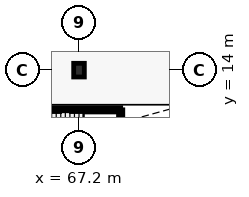
"""IFC4 building model, lengths in metres.
Left out: names, types, materials, properties, quantities, classifications, styles, units other than length and angle.
Written with IfcOpenShell. Run it as: python <this file> out.ifc"""

import sys

from ifc_helpers import new_model, si_unit, direction, frame, frame_2d, origin, origin_2d, place, context, subcontext, project, spatial, rectangle, extrude, element, save


model = new_model("IFC4")
c1 = context("Model", 3, precision=1e-05, world=origin(), true_north=direction((0.0, 1.0)))
c2 = subcontext(c1, "Body", "Model", "MODEL_VIEW")
j1 = project(units=[si_unit("LENGTHUNIT", "METRE"), si_unit("PLANEANGLEUNIT", "RADIAN")], contexts=[c1])
p1 = place(None, origin())
s1 = spatial("IfcSite", under=j1, at=p1, CompositionType="ELEMENT")
p2 = place(p1, origin())
s2 = spatial("IfcBuilding", under=s1, at=p2, CompositionType="ELEMENT")
p3 = place(p2, origin())
s3 = spatial("IfcBuildingStorey", under=s2, at=p3, CompositionType="ELEMENT", Elevation=0.0)
p4 = place(p3, frame((67.2, 14.0, -0.46), z_axis=(0.0, 0.0, 1.0), x_axis=(1.0, 0.0, 0.0)))
e1 = element("IfcColumn", 1, at=p4, inside=s3, PredefinedType="COLUMN", context=c2, shape_type="SweptSolid", body=[
    extrude(rectangle(XDim=0.7, YDim=0.9, at=origin_2d()), origin(), (0.0, 0.0, 1.0), 5.9),
])
p5 = place(p3, frame((61.06, 11.39, 0.0), z_axis=(0.0, 0.0, 1.0), x_axis=(1.0, 0.0, 0.0)))
e2 = element("IfcWall", 2, at=p5, inside=s3, PredefinedType="SHEAR", context=c2, shape_type="SweptSolid", body=[
    extrude(rectangle(XDim=8.88, YDim=0.28, at=frame_2d((4.44, 0.0))), origin(), (0.0, 0.0, 1.0), 5.44),
])
p6 = place(p3, frame((69.94, 7.96, 0.0), z_axis=(0.0, 0.0, 1.0), x_axis=(0.0, 1.0, 0.0)))
e3 = element("IfcWall", 3, at=p6, inside=s3, PredefinedType="SHEAR", context=c2, shape_type="SweptSolid", body=[
    extrude(rectangle(XDim=3.43, YDim=0.28, at=frame_2d((1.715, 0.0))), origin(), (0.0, 0.0, 1.0), 5.44),
])
save(model, sys.argv[1])
